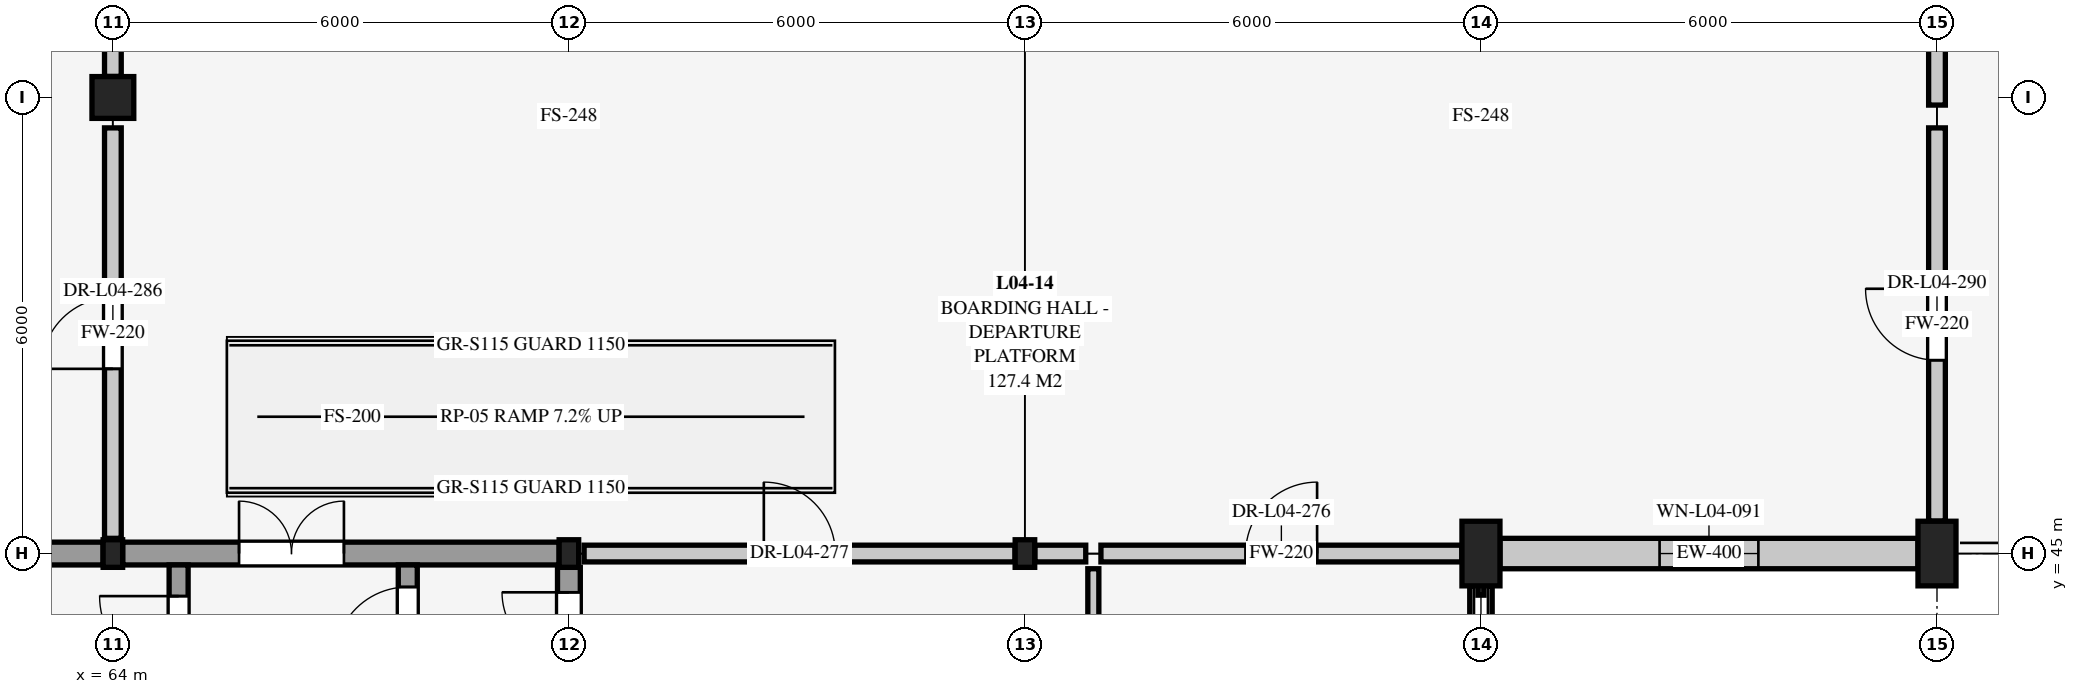
"""IFC4 building model, lengths in metres.
Left out: names, types, materials, properties, quantities, classifications, styles, units other than length and angle.
Written with IfcOpenShell. Run it as: python <this file> out.ifc"""

import sys

from ifc_helpers import new_model, si_unit, direction, frame, frame_2d, origin, origin_2d, place, context, subcontext, project, spatial, rectangle, i_section, extrude, element, fill, save


model = new_model("IFC4")
c1 = context("Model", 3, precision=1e-05, world=origin(), true_north=direction((0.0, 1.0)))
c2 = subcontext(c1, "Body", "Model", "MODEL_VIEW")
j1 = project(units=[si_unit("LENGTHUNIT", "METRE"), si_unit("PLANEANGLEUNIT", "RADIAN")], contexts=[c1])
p1 = place(None, origin())
s1 = spatial("IfcSite", under=j1, at=p1, CompositionType="ELEMENT")
p2 = place(p1, origin())
s2 = spatial("IfcBuilding", under=s1, at=p2, CompositionType="ELEMENT")
p3 = place(p2, frame((0.0, 0.0, 13.5)))
s3 = spatial("IfcBuildingStorey", under=s2, at=p3, CompositionType="ELEMENT", Elevation=13.5)
p4 = place(p3, frame((64.0, 45.0, 0.0), z_axis=(0.0, 0.0, 1.0), x_axis=(1.0, 0.0, 0.0)))
e1 = element("IfcColumn", 1, at=p4, inside=s3, PredefinedType="COLUMN", context=c2, shape_type="SweptSolid", body=[
    extrude(i_section(OverallWidth=0.257, OverallDepth=0.363, WebThickness=0.013, FlangeThickness=0.022, at=origin_2d()), origin(), (0.0, 0.0, 1.0), 4.5),
])
p5 = place(p3, frame((64.0, 51.0, 0.0), z_axis=(0.0, 0.0, 1.0), x_axis=(1.0, 0.0, 0.0)))
e2 = element("IfcColumn", 2, at=p5, inside=s3, PredefinedType="COLUMN", context=c2, shape_type="SweptSolid", body=[
    extrude(rectangle(XDim=0.55, YDim=0.55, at=origin_2d()), origin(), (0.0, 0.0, 1.0), 4.5),
])
for number, where, z_axis, x_axis in (
    (3, (70.0, 45.0, 0.0), (0.0, 0.0, 1.0), (1.0, 0.0, 0.0)),
    (4, (76.0, 45.0, 0.0), (0.0, 0.0, 1.0), (1.0, 0.0, 0.0)),
):
    element("IfcColumn", number, at=place(p3, frame(where, z_axis=z_axis, x_axis=x_axis)), inside=s3, PredefinedType="COLUMN", context=c2, shape_type="SweptSolid", body=[
        extrude(i_section(OverallWidth=0.257, OverallDepth=0.363, WebThickness=0.013, FlangeThickness=0.022, at=origin_2d()), origin(), (0.0, 0.0, 1.0), 4.5),
    ])
for number, where, z_axis, x_axis in (
    (5, (82.0, 45.0, 0.0), (0.0, 0.0, 1.0), (1.0, 0.0, 0.0)),
    (6, (88.0, 45.0, 0.0), (0.0, 0.0, 1.0), (1.0, 0.0, 0.0)),
):
    element("IfcColumn", number, at=place(p3, frame(where, z_axis=z_axis, x_axis=x_axis)), inside=s3, PredefinedType="PILASTER", context=c2, shape_type="SweptSolid", body=[
        extrude(rectangle(XDim=0.5, YDim=0.85, at=origin_2d()), origin(), (0.0, 0.0, 1.0), 4.5),
    ])
p6 = place(p3, frame((82.0, 44.575, 0.0), z_axis=(0.0, 0.0, 1.0), x_axis=(0.0, -1.0, 0.0)))
e7 = element("IfcWall", 7, at=p6, inside=s3, PredefinedType="SOLIDWALL", context=c2, shape_type="SweptSolid", body=[
    extrude(rectangle(XDim=5.3, YDim=0.295, at=frame_2d((2.65, 0.0))), origin(), (0.0, 0.0, 1.0), 0.36),
])
p7 = place(p3, frame((87.75, 45.0, 0.0), z_axis=(0.0, 0.0, 1.0), x_axis=(-1.0, 0.0, 0.0)))
e8 = element("IfcWall", 8, at=p7, inside=s3, PredefinedType="SOLIDWALL", context=c2, shape_type="SweptSolid", body=[
    extrude(rectangle(XDim=5.5, YDim=0.4, at=frame_2d((2.75, 0.0))), origin(), (0.0, 0.0, 1.0), 8.593),
])
p8 = place(p7, frame((2.1, 0.0, 1.3)))
e9 = element("IfcOpeningElement", 9, at=p8, cuts=e8, PredefinedType="OPENING", context=c2, shape_type="SweptSolid", body=[
    extrude(rectangle(XDim=1.3, YDim=1.45, at=frame_2d((0.65, 0.725))), frame((0.0, 0.21, 0.0), z_axis=(0.0, -1.0, 0.0), x_axis=(1.0, 0.0, 0.0)), (0.0, 0.0, 1.0), 0.42),
])
p9 = place(p3, frame((58.275, 45.0, 0.0), z_axis=(0.0, 0.0, 1.0), x_axis=(1.0, 0.0, 0.0)))
e10 = element("IfcWall", 10, at=p9, inside=s3, PredefinedType="SHEAR", context=c2, shape_type="SweptSolid", body=[
    extrude(rectangle(XDim=5.597, YDim=0.3, at=frame_2d((2.798, 0.0))), origin(), (0.0, 0.0, 1.0), 4.204),
])
p10 = place(p9, frame((3.655, 0.0, 0.0)))
e11 = element("IfcOpeningElement", 11, at=p10, cuts=e10, PredefinedType="OPENING", context=c2, shape_type="SweptSolid", body=[
    extrude(rectangle(XDim=1.04, YDim=2.14, at=frame_2d((0.52, 1.07))), frame((0.0, 0.16, 0.0), z_axis=(0.0, -1.0, 0.0), x_axis=(1.0, 0.0, 0.0)), (0.0, 0.0, 1.0), 0.32),
])
p11 = place(p3, frame((64.128, 45.0, 0.0), z_axis=(0.0, 0.0, 1.0), x_axis=(1.0, 0.0, 0.0)))
e12 = element("IfcWall", 12, at=p11, inside=s3, PredefinedType="SHEAR", context=c2, shape_type="SweptSolid", body=[
    extrude(rectangle(XDim=5.743, YDim=0.3, at=frame_2d((2.872, 0.0))), origin(), (0.0, 0.0, 1.0), 4.204),
])
p12 = place(p11, frame((1.531, 0.0, 0.0)))
e13 = element("IfcOpeningElement", 13, at=p12, cuts=e12, PredefinedType="OPENING", context=c2, shape_type="SweptSolid", body=[
    extrude(rectangle(XDim=1.38, YDim=2.16, at=frame_2d((0.69, 1.08))), frame((0.0, 0.16, 0.0), z_axis=(0.0, -1.0, 0.0), x_axis=(1.0, 0.0, 0.0)), (0.0, 0.0, 1.0), 0.32),
])
p13 = place(p3, frame((70.0, 39.275, 0.0), z_axis=(0.0, 0.0, 1.0), x_axis=(0.0, 1.0, 0.0)))
e14 = element("IfcWall", 14, at=p13, inside=s3, PredefinedType="SHEAR", context=c2, shape_type="SweptSolid", body=[
    extrude(rectangle(XDim=5.544, YDim=0.3, at=frame_2d((2.772, 0.0))), origin(), (0.0, 0.0, 1.0), 4.204),
])
p14 = place(p13, frame((4.335, 0.0, 0.0)))
e15 = element("IfcOpeningElement", 15, at=p14, cuts=e14, PredefinedType="OPENING", context=c2, shape_type="SweptSolid", body=[
    extrude(rectangle(XDim=0.88, YDim=2.08, at=frame_2d((0.44, 1.04))), frame((0.0, 0.16, 0.0), z_axis=(0.0, -1.0, 0.0), x_axis=(1.0, 0.0, 0.0)), (0.0, 0.0, 1.0), 0.32),
])
p15 = place(p3, frame((64.865, 39.175, 0.0), z_axis=(0.0, 0.0, 1.0), x_axis=(0.0, 1.0, 0.0)))
e16 = element("IfcWall", 16, at=p15, inside=s3, PredefinedType="SHEAR", context=c2, shape_type="SweptSolid", body=[
    extrude(rectangle(XDim=5.675, YDim=0.25, at=frame_2d((2.837, 0.0))), origin(), (0.0, 0.0, 1.0), 4.204),
])
p16 = place(p15, frame((4.225, 0.0, 0.0)))
e17 = element("IfcOpeningElement", 17, at=p16, cuts=e16, PredefinedType="OPENING", context=c2, shape_type="SweptSolid", body=[
    extrude(rectangle(XDim=1.04, YDim=2.14, at=frame_2d((0.52, 1.07))), frame((0.0, 0.135, 0.0), z_axis=(0.0, -1.0, 0.0), x_axis=(1.0, 0.0, 0.0)), (0.0, 0.0, 1.0), 0.27),
])
p17 = place(p15, frame((1.395, 0.0, 0.0)))
e18 = element("IfcOpeningElement", 18, at=p17, cuts=e16, PredefinedType="OPENING", context=c2, shape_type="SweptSolid", body=[
    extrude(rectangle(XDim=0.96, YDim=2.12, at=frame_2d((0.48, 1.06))), frame((0.0, 0.135, 0.0), z_axis=(0.0, -1.0, 0.0), x_axis=(1.0, 0.0, 0.0)), (0.0, 0.0, 1.0), 0.27),
])
p18 = place(p3, frame((67.88, 42.2, 0.0), z_axis=(0.0, 0.0, 1.0), x_axis=(0.0, 1.0, 0.0)))
e19 = element("IfcWall", 19, at=p18, inside=s3, PredefinedType="SHEAR", context=c2, shape_type="SweptSolid", body=[
    extrude(rectangle(XDim=2.65, YDim=0.25, at=frame_2d((1.325, 0.0))), origin(), (0.0, 0.0, 1.0), 4.204),
])
p19 = place(p18, frame((0.28, 0.0, 0.0)))
e20 = element("IfcOpeningElement", 20, at=p19, cuts=e19, PredefinedType="OPENING", context=c2, shape_type="SweptSolid", body=[
    extrude(rectangle(XDim=0.88, YDim=2.08, at=frame_2d((0.44, 1.04))), frame((0.0, 0.135, 0.0), z_axis=(0.0, -1.0, 0.0), x_axis=(1.0, 0.0, 0.0)), (0.0, 0.0, 1.0), 0.27),
])
p20 = place(p18, frame((1.4, 0.0, 0.0)))
e21 = element("IfcOpeningElement", 21, at=p20, cuts=e19, PredefinedType="OPENING", context=c2, shape_type="SweptSolid", body=[
    extrude(rectangle(XDim=0.96, YDim=2.12, at=frame_2d((0.48, 1.06))), frame((0.0, 0.135, 0.0), z_axis=(0.0, -1.0, 0.0), x_axis=(1.0, 0.0, 0.0)), (0.0, 0.0, 1.0), 0.27),
])
p21 = place(p3, frame((76.9, 38.0, 0.0), z_axis=(0.0, 0.0, 1.0), x_axis=(0.0, 1.0, 0.0)))
e22 = element("IfcWall", 22, at=p21, inside=s3, PredefinedType="PARTITIONING", context=c2, shape_type="SweptSolid", body=[
    extrude(rectangle(XDim=6.8, YDim=0.145, at=frame_2d((3.4, 0.0))), origin(), (0.0, 0.0, 1.0), 4.204),
])
p22 = place(p21, frame((2.93, 0.0, 0.0)))
e23 = element("IfcOpeningElement", 23, at=p22, cuts=e22, PredefinedType="OPENING", context=c2, shape_type="SweptSolid", body=[
    extrude(rectangle(XDim=0.94, YDim=2.1, at=frame_2d((0.47, 1.05))), frame((0.0, 0.083, 0.0), z_axis=(0.0, -1.0, 0.0), x_axis=(1.0, 0.0, 0.0)), (0.0, 0.0, 1.0), 0.165),
])
p23 = place(p3, frame((77.0, 45.0, 0.0), z_axis=(0.0, 0.0, 1.0), x_axis=(1.0, 0.0, 0.0)))
e24 = element("IfcWall", 24, at=p23, inside=s3, PredefinedType="SOLIDWALL", context=c2, shape_type="SweptSolid", body=[
    extrude(rectangle(XDim=4.748, YDim=0.22, at=frame_2d((2.374, 0.0))), origin(), (0.0, 0.0, 1.0), 3.85),
])
p24 = place(p23, frame((1.904, 0.0, 0.0)))
e25 = element("IfcOpeningElement", 25, at=p24, cuts=e24, PredefinedType="OPENING", context=c2, shape_type="SweptSolid", body=[
    extrude(rectangle(XDim=0.94, YDim=2.1, at=frame_2d((0.47, 1.05))), frame((0.0, 0.12, 0.0), z_axis=(0.0, -1.0, 0.0), x_axis=(1.0, 0.0, 0.0)), (0.0, 0.0, 1.0), 0.24),
])
p25 = place(p3, frame((70.2, 45.0, 0.0), z_axis=(0.0, 0.0, 1.0), x_axis=(1.0, 0.0, 0.0)))
e26 = element("IfcWall", 26, at=p25, inside=s3, PredefinedType="SOLIDWALL", context=c2, shape_type="SweptSolid", body=[
    extrude(rectangle(XDim=5.669, YDim=0.22, at=frame_2d((2.835, 0.0))), origin(), (0.0, 0.0, 1.0), 3.747),
])
p26 = place(p25, frame((2.365, 0.0, 0.0)))
e27 = element("IfcOpeningElement", 27, at=p26, cuts=e26, PredefinedType="OPENING", context=c2, shape_type="SweptSolid", body=[
    extrude(rectangle(XDim=0.94, YDim=2.1, at=frame_2d((0.47, 1.05))), frame((0.0, 0.12, 0.0), z_axis=(0.0, -1.0, 0.0), x_axis=(1.0, 0.0, 0.0)), (0.0, 0.0, 1.0), 0.24),
])
p27 = place(p3, frame((76.131, 45.0, 0.0), z_axis=(0.0, 0.0, 1.0), x_axis=(1.0, 0.0, 0.0)))
e28 = element("IfcWall", 28, at=p27, inside=s3, PredefinedType="SOLIDWALL", context=c2, shape_type="SweptSolid", body=[
    extrude(rectangle(XDim=0.669, YDim=0.22, at=frame_2d((0.335, 0.0))), origin(), (0.0, 0.0, 1.0), 3.85),
])
p28 = place(p3, frame((64.0, 45.2, 0.0), z_axis=(0.0, 0.0, 1.0), x_axis=(0.0, 1.0, 0.0)))
e29 = element("IfcWall", 29, at=p28, inside=s3, PredefinedType="SOLIDWALL", context=c2, shape_type="SweptSolid", body=[
    extrude(rectangle(XDim=5.4, YDim=0.22, at=frame_2d((2.7, 0.0))), origin(), (0.0, 0.0, 1.0), 3.747),
])
p29 = place(p28, frame((2.23, 0.0, 0.0)))
e30 = element("IfcOpeningElement", 30, at=p29, cuts=e29, PredefinedType="OPENING", context=c2, shape_type="SweptSolid", body=[
    extrude(rectangle(XDim=0.94, YDim=2.1, at=frame_2d((0.47, 1.05))), frame((0.0, 0.12, 0.0), z_axis=(0.0, -1.0, 0.0), x_axis=(1.0, 0.0, 0.0)), (0.0, 0.0, 1.0), 0.24),
])
p30 = place(p3, frame((64.0, 51.277, 0.0), z_axis=(0.0, 0.0, 1.0), x_axis=(0.0, 1.0, 0.0)))
e31 = element("IfcWall", 31, at=p30, inside=s3, PredefinedType="SOLIDWALL", context=c2, shape_type="SweptSolid", body=[
    extrude(rectangle(XDim=2.023, YDim=0.22, at=frame_2d((1.011, 0.0))), origin(), (0.0, 0.0, 1.0), 3.896),
])
p31 = place(p30, frame((0.542, 0.0, 0.0)))
e32 = element("IfcOpeningElement", 32, at=p31, cuts=e31, PredefinedType="OPENING", context=c2, shape_type="SweptSolid", body=[
    extrude(rectangle(XDim=0.94, YDim=2.1, at=frame_2d((0.47, 1.05))), frame((0.0, 0.12, 0.0), z_axis=(0.0, -1.0, 0.0), x_axis=(1.0, 0.0, 0.0)), (0.0, 0.0, 1.0), 0.24),
])
p32 = place(p3, frame((88.0, 45.427, 0.0), z_axis=(0.0, 0.0, 1.0), x_axis=(0.0, 1.0, 0.0)))
e33 = element("IfcWall", 33, at=p32, inside=s3, PredefinedType="SOLIDWALL", context=c2, shape_type="SweptSolid", body=[
    extrude(rectangle(XDim=5.173, YDim=0.22, at=frame_2d((2.586, 0.0))), origin(), (0.0, 0.0, 1.0), 3.633),
])
p33 = place(p32, frame((2.116, 0.0, 0.0)))
e34 = element("IfcOpeningElement", 34, at=p33, cuts=e33, PredefinedType="OPENING", context=c2, shape_type="SweptSolid", body=[
    extrude(rectangle(XDim=0.94, YDim=2.1, at=frame_2d((0.47, 1.05))), frame((0.0, 0.12, 0.0), z_axis=(0.0, -1.0, 0.0), x_axis=(1.0, 0.0, 0.0)), (0.0, 0.0, 1.0), 0.24),
])
p34 = place(p3, frame((88.0, 50.9, 0.0), z_axis=(0.0, 0.0, 1.0), x_axis=(0.0, 1.0, 0.0)))
e35 = element("IfcWall", 35, at=p34, inside=s3, PredefinedType="SOLIDWALL", context=c2, shape_type="SweptSolid", body=[
    extrude(rectangle(XDim=5.173, YDim=0.22, at=frame_2d((2.586, 0.0))), origin(), (0.0, 0.0, 1.0), 3.633),
])
p35 = place(p34, frame((2.116, 0.0, 0.0)))
e36 = element("IfcOpeningElement", 36, at=p35, cuts=e35, PredefinedType="OPENING", context=c2, shape_type="SweptSolid", body=[
    extrude(rectangle(XDim=0.94, YDim=2.1, at=frame_2d((0.47, 1.05))), frame((0.0, 0.12, 0.0), z_axis=(0.0, -1.0, 0.0), x_axis=(1.0, 0.0, 0.0)), (0.0, 0.0, 1.0), 0.24),
])
p36 = place(p8, origin())
e37 = element("IfcWindow", 37, at=p36, inside=s3, PartitioningType="SINGLE_PANEL", PredefinedType="WINDOW", context=c2, shape_type="SweptSolid", body=[
    extrude(rectangle(XDim=1.3, YDim=1.45, at=frame_2d((0.65, 0.725))), frame((0.0, 0.03, 0.0), z_axis=(0.0, -1.0, 0.0), x_axis=(1.0, 0.0, 0.0)), (0.0, 0.0, 1.0), 0.06),
])
fill(e9, e37)
p37 = place(p12, origin())
e38 = element("IfcDoor", 38, at=p37, inside=s3, OperationType="DOUBLE_DOOR_SINGLE_SWING", PredefinedType="DOOR", context=c2, shape_type="SweptSolid", body=[
    extrude(rectangle(XDim=1.38, YDim=2.16, at=frame_2d((0.69, 1.08))), frame((0.0, 0.025, 0.0), z_axis=(0.0, -1.0, 0.0), x_axis=(1.0, 0.0, 0.0)), (0.0, 0.0, 1.0), 0.05),
])
fill(e13, e38)
p38 = place(p14, origin())
e39 = element("IfcDoor", 39, at=p38, inside=s3, OperationType="SINGLE_SWING_RIGHT", PredefinedType="DOOR", context=c2, shape_type="SweptSolid", body=[
    extrude(rectangle(XDim=0.88, YDim=2.08, at=frame_2d((0.44, 1.04))), frame((0.0, 0.025, 0.0), z_axis=(0.0, -1.0, 0.0), x_axis=(1.0, 0.0, 0.0)), (0.0, 0.0, 1.0), 0.05),
])
fill(e15, e39)
p39 = place(p16, origin())
e40 = element("IfcDoor", 40, at=p39, inside=s3, OperationType="SINGLE_SWING_RIGHT", PredefinedType="DOOR", context=c2, shape_type="SweptSolid", body=[
    extrude(rectangle(XDim=1.04, YDim=2.14, at=frame_2d((0.52, 1.07))), frame((0.0, 0.025, 0.0), z_axis=(0.0, -1.0, 0.0), x_axis=(1.0, 0.0, 0.0)), (0.0, 0.0, 1.0), 0.05),
])
fill(e17, e40)
p40 = place(p20, origin())
e41 = element("IfcDoor", 41, at=p40, inside=s3, OperationType="SINGLE_SWING_LEFT", PredefinedType="DOOR", context=c2, shape_type="SweptSolid", body=[
    extrude(rectangle(XDim=0.96, YDim=2.12, at=frame_2d((0.48, 1.06))), frame((0.0, 0.025, 0.0), z_axis=(0.0, -1.0, 0.0), x_axis=(1.0, 0.0, 0.0)), (0.0, 0.0, 1.0), 0.05),
])
fill(e21, e41)
p41 = place(p24, origin())
e42 = element("IfcDoor", 42, at=p41, inside=s3, OperationType="SINGLE_SWING_RIGHT", PredefinedType="DOOR", context=c2, shape_type="SweptSolid", body=[
    extrude(rectangle(XDim=0.94, YDim=2.1, at=frame_2d((0.47, 1.05))), frame((0.0, 0.025, 0.0), z_axis=(0.0, -1.0, 0.0), x_axis=(1.0, 0.0, 0.0)), (0.0, 0.0, 1.0), 0.05),
])
fill(e25, e42)
p42 = place(p26, origin())
e43 = element("IfcDoor", 43, at=p42, inside=s3, OperationType="SINGLE_SWING_LEFT", PredefinedType="DOOR", context=c2, shape_type="SweptSolid", body=[
    extrude(rectangle(XDim=0.94, YDim=2.1, at=frame_2d((0.47, 1.05))), frame((0.0, 0.025, 0.0), z_axis=(0.0, -1.0, 0.0), x_axis=(1.0, 0.0, 0.0)), (0.0, 0.0, 1.0), 0.05),
])
fill(e27, e43)
p43 = place(p29, origin())
e44 = element("IfcDoor", 44, at=p43, inside=s3, OperationType="SINGLE_SWING_LEFT", PredefinedType="DOOR", context=c2, shape_type="SweptSolid", body=[
    extrude(rectangle(XDim=0.94, YDim=2.1, at=frame_2d((0.47, 1.05))), frame((0.0, 0.025, 0.0), z_axis=(0.0, -1.0, 0.0), x_axis=(1.0, 0.0, 0.0)), (0.0, 0.0, 1.0), 0.05),
])
fill(e30, e44)
p44 = place(p33, origin())
e45 = element("IfcDoor", 45, at=p44, inside=s3, OperationType="SINGLE_SWING_RIGHT", PredefinedType="DOOR", context=c2, shape_type="SweptSolid", body=[
    extrude(rectangle(XDim=0.94, YDim=2.1, at=frame_2d((0.47, 1.05))), frame((0.0, 0.025, 0.0), z_axis=(0.0, -1.0, 0.0), x_axis=(1.0, 0.0, 0.0)), (0.0, 0.0, 1.0), 0.05),
])
fill(e34, e45)
save(model, sys.argv[1])
